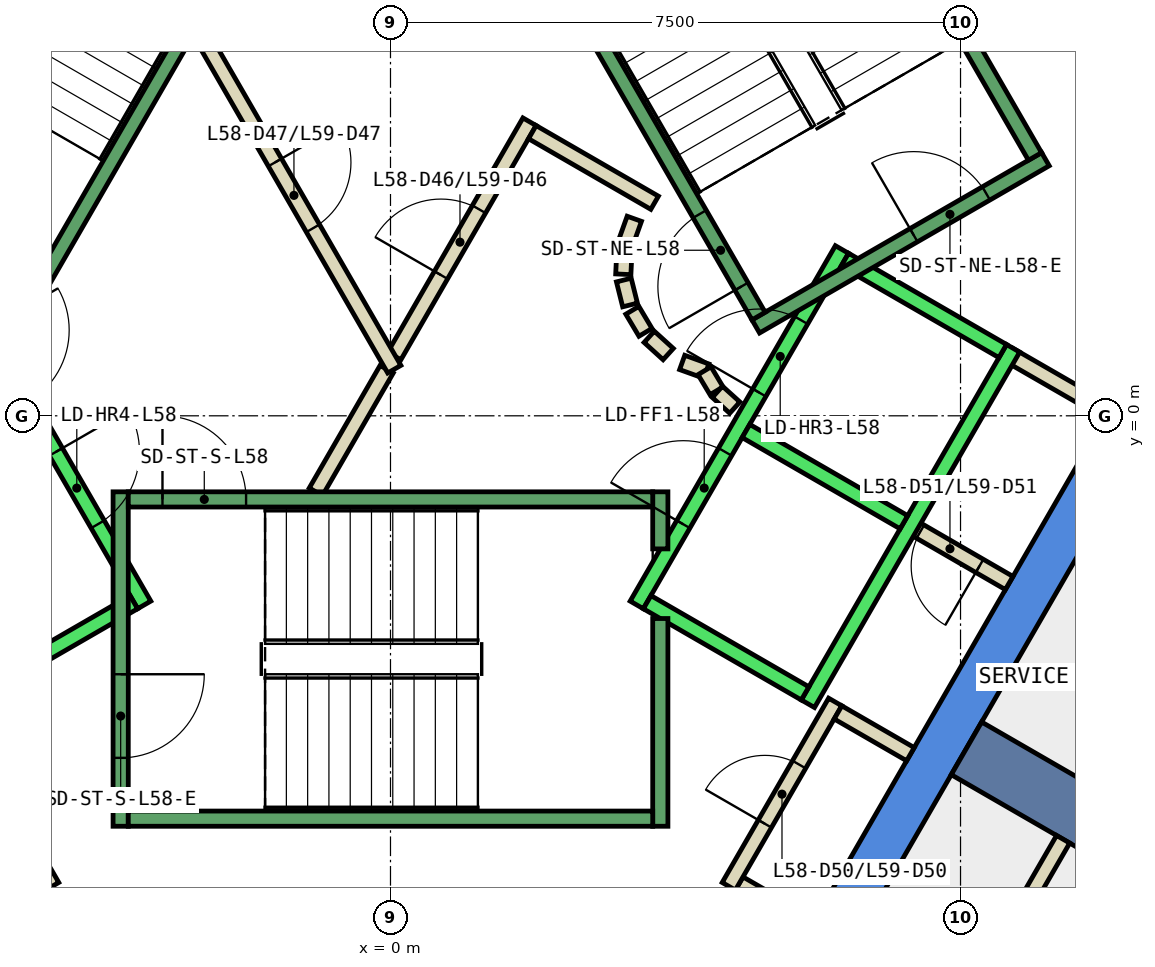
"""IFC4 building model, lengths in metres.
Left out: names, types, materials, properties, quantities, classifications, styles, units other than length and angle.
Written with IfcOpenShell. Run it as: python <this file> out.ifc"""

import sys

from ifc_helpers import new_model, si_unit, direction, frame, frame_2d, origin, place, context, subcontext, project, spatial, polyline, rectangle, outline, extrude, element, fill, save


model = new_model("IFC4")
c1 = context("Model", 3, precision=1e-05, world=origin(), true_north=direction((0.0, 1.0)))
c2 = subcontext(c1, "Body", "Model", "MODEL_VIEW")
j1 = project(units=[si_unit("LENGTHUNIT", "METRE"), si_unit("PLANEANGLEUNIT", "RADIAN")], contexts=[c1])
p1 = place(None, origin())
s1 = spatial("IfcSite", under=j1, at=p1, CompositionType="ELEMENT")
p2 = place(p1, origin())
s2 = spatial("IfcBuilding", under=s1, at=p2, CompositionType="ELEMENT")
p3 = place(p2, frame((0.0, 0.0, 255.8)))
s3 = spatial("IfcBuildingStorey", under=s2, at=p3, CompositionType="ELEMENT", Elevation=255.8)
p4 = place(p3, frame((0.0, 0.0, -0.34)))
e1 = element("IfcWall", 1, at=p4, inside=s3, PredefinedType="SHEAR", context=c2, shape_type="SweptSolid", body=[
    extrude(outline(polyline([(6.786, 10.747), (6.266, 10.447), (10.854, 2.5), (11.547, 2.5), (6.786, 10.747)])), origin(), (0.0, 0.0, 1.0), 3.6),
])
p5 = place(p3, frame((0.0, 0.0, -0.34)))
e2 = element("IfcWall", 2, at=p5, inside=s3, PredefinedType="SHEAR", context=c2, shape_type="SweptSolid", body=[
    extrude(outline(polyline([(5.774, -7.5), (11.547, 2.5), (10.854, 2.5), (5.427, -6.9), (5.774, -7.5)])), origin(), (0.0, 0.0, 1.0), 3.6),
])
p6 = place(p3, frame((7.578, -4.375, -0.34), z_axis=(0.0, 0.0, 1.0), x_axis=(0.866024315419, -0.5000018851, 0.0)))
e3 = element("IfcWall", 3, at=p6, inside=s3, PredefinedType="SHEAR", context=c2, shape_type="SweptSolid", body=[
    extrude(rectangle(XDim=9.0, YDim=0.8, at=frame_2d((4.5, 0.0))), origin(), (0.0, 0.0, 1.0), 3.6),
])
p7 = place(p3, frame((5.541, -6.703, 0.0), z_axis=(0.0, 0.0, 1.0), x_axis=(-0.86621513555, 0.499671230855, 0.0)))
e4 = element("IfcWall", 4, at=p7, inside=s3, PredefinedType="PARTITIONING", context=c2, shape_type="SweptSolid", body=[
    extrude(rectangle(XDim=1.1, YDim=0.2, at=frame_2d((0.55, 0.0))), origin(), (0.0, 0.0, 1.0), 3.26),
])
p8 = place(p3, frame((4.451, -6.19, 0.0), z_axis=(0.0, 0.0, 1.0), x_axis=(0.500011755427, 0.866018616679, 0.0)))
e5 = element("IfcWall", 5, at=p8, inside=s3, PredefinedType="PARTITIONING", context=c2, shape_type="SweptSolid", body=[
    extrude(rectangle(XDim=2.8, YDim=0.2, at=frame_2d((1.4, 0.0))), origin(), (0.0, 0.0, 1.0), 3.26),
])
p9 = place(p8, frame((0.95, 0.0, 0.0)))
e6 = element("IfcOpeningElement", 6, at=p9, cuts=e5, PredefinedType="OPENING", context=c2, shape_type="SweptSolid", body=[
    extrude(rectangle(XDim=0.9, YDim=2.1, at=frame_2d((0.45, 1.05))), frame((0.0, 0.11, 0.0), z_axis=(0.0, -1.0, 0.0), x_axis=(1.0, 0.0, 0.0)), (0.0, 0.0, 1.0), 0.22),
])
p10 = place(p3, frame((5.888, -3.902, 0.0), z_axis=(0.0, 0.0, 1.0), x_axis=(0.86621513555, -0.499671230855, 0.0)))
e7 = element("IfcWall", 7, at=p10, inside=s3, PredefinedType="PARTITIONING", context=c2, shape_type="SweptSolid", body=[
    extrude(rectangle(XDim=1.1, YDim=0.2, at=frame_2d((0.55, 0.0))), origin(), (0.0, 0.0, 1.0), 3.26),
])
p11 = place(p3, frame((8.14, -2.2, 0.0), z_axis=(0.0, 0.0, 1.0), x_axis=(-0.865545166185, 0.500830874941, 0.0)))
e8 = element("IfcWall", 8, at=p11, inside=s3, PredefinedType="PARTITIONING", context=c2, shape_type="SweptSolid", body=[
    extrude(rectangle(XDim=1.5, YDim=0.2, at=frame_2d((0.75, 0.0))), origin(), (0.0, 0.0, 1.0), 3.26),
])
p12 = place(p11, frame((0.45, 0.0, 0.0)))
e9 = element("IfcOpeningElement", 9, at=p12, cuts=e8, PredefinedType="OPENING", context=c2, shape_type="SweptSolid", body=[
    extrude(rectangle(XDim=0.9, YDim=2.1, at=frame_2d((0.45, 1.05))), frame((0.0, 0.11, 0.0), z_axis=(0.0, -1.0, 0.0), x_axis=(1.0, 0.0, 0.0)), (0.0, 0.0, 1.0), 0.22),
])
p13 = place(p3, frame((8.141, 0.801, 0.0), z_axis=(0.0, 0.0, 1.0), x_axis=(0.866434738017, -0.499290341141, 0.0)))
e10 = element("IfcWall", 10, at=p13, inside=s3, PredefinedType="PARTITIONING", context=c2, shape_type="SweptSolid", body=[
    extrude(rectangle(XDim=1.5, YDim=0.2, at=frame_2d((0.75, 0.0))), origin(), (0.0, 0.0, 1.0), 3.26),
])
p14 = place(p3, frame((-5.851, -3.765, 0.0), z_axis=(0.0, 0.0, 1.0), x_axis=(0.500011755427, -0.866018616679, 0.0)))
e11 = element("IfcWall", 11, at=p14, inside=s3, PredefinedType="PARTITIONING", context=c2, shape_type="SweptSolid", body=[
    extrude(rectangle(XDim=2.8, YDim=0.2, at=frame_2d((1.4, 0.0))), origin(), (0.0, 0.0, 1.0), 3.26),
])
p15 = place(p14, frame((0.95, 0.0, 0.0)))
e12 = element("IfcOpeningElement", 12, at=p15, cuts=e11, PredefinedType="OPENING", context=c2, shape_type="SweptSolid", body=[
    extrude(rectangle(XDim=0.9, YDim=2.1, at=frame_2d((0.45, 1.05))), frame((0.0, 0.11, 0.0), z_axis=(0.0, -1.0, 0.0), x_axis=(1.0, 0.0, 0.0)), (0.0, 0.0, 1.0), 0.22),
])
p16 = place(p3, frame((7.8, -7.39, 0.0), z_axis=(0.0, 0.0, 1.0), x_axis=(0.499977374825, 0.866038466041, 0.0)))
e13 = element("IfcWall", 13, at=p16, inside=s3, PredefinedType="PARTITIONING", context=c2, shape_type="SweptSolid", body=[
    extrude(rectangle(XDim=2.1, YDim=0.2, at=frame_2d((1.05, 0.0))), origin(), (0.0, 0.0, 1.0), 3.26),
])
p17 = place(p3, frame((-0.982, -1.0, 0.0), z_axis=(0.0, 0.0, 1.0), x_axis=(0.50024047865, 0.865886518847, 0.0)))
e14 = element("IfcWall", 14, at=p17, inside=s3, PredefinedType="PARTITIONING", context=c2, shape_type="SweptSolid", body=[
    extrude(rectangle(XDim=1.863, YDim=0.2, at=frame_2d((0.931, 0.0))), origin(), (0.0, 0.0, 1.0), 3.26),
])
p18 = place(p3, frame((0.05, 0.787, 0.0), z_axis=(0.0, 0.0, 1.0), x_axis=(0.499954076797, 0.866051915934, 0.0)))
e15 = element("IfcWall", 15, at=p18, inside=s3, PredefinedType="PARTITIONING", context=c2, shape_type="SweptSolid", body=[
    extrude(rectangle(XDim=3.558, YDim=0.2, at=frame_2d((1.779, 0.0))), origin(), (0.0, 0.0, 1.0), 3.26),
])
p19 = place(p18, frame((1.229, 0.0, 0.0)))
e16 = element("IfcOpeningElement", 16, at=p19, cuts=e15, PredefinedType="OPENING", context=c2, shape_type="SweptSolid", body=[
    extrude(rectangle(XDim=1.0, YDim=2.1, at=frame_2d((0.5, 1.05))), frame((0.0, 0.11, 0.0), z_axis=(0.0, -1.0, 0.0), x_axis=(1.0, 0.0, 0.0)), (0.0, 0.0, 1.0), 0.22),
])
p20 = place(p3, frame((1.866, 3.732, 0.0), z_axis=(0.0, 0.0, 1.0), x_axis=(0.866043361281, -0.499968895414, 0.0)))
e17 = element("IfcWall", 17, at=p20, inside=s3, PredefinedType="PARTITIONING", context=c2, shape_type="SweptSolid", body=[
    extrude(rectangle(XDim=1.858, YDim=0.2, at=frame_2d((0.929, 0.0))), origin(), (0.0, 0.0, 1.0), 3.26),
])
p21 = place(p3, frame((3.208, 2.592, 0.0), z_axis=(0.0, 0.0, 1.0), x_axis=(-0.337388820924, -0.941365382578, 0.0)))
e18 = element("IfcWall", 18, at=p21, inside=s3, PredefinedType="PARTITIONING", context=c2, shape_type="SweptSolid", body=[
    extrude(rectangle(XDim=0.338, YDim=0.2, at=frame_2d((0.169, 0.0))), origin(), (0.0, 0.0, 1.0), 3.26),
])
p22 = place(p3, frame((3.079, 2.199, 0.0), z_axis=(0.0, 0.0, 1.0), x_axis=(-0.047771483479, -0.998858290933, 0.0)))
e19 = element("IfcWall", 19, at=p22, inside=s3, PredefinedType="PARTITIONING", context=c2, shape_type="SweptSolid", body=[
    extrude(rectangle(XDim=0.337, YDim=0.2, at=frame_2d((0.169, 0.0))), origin(), (0.0, 0.0, 1.0), 3.26),
])
p23 = place(p3, frame((3.07, 1.786, 0.0), z_axis=(0.0, 0.0, 1.0), x_axis=(0.242705583207, -0.970099994784, 0.0)))
e20 = element("IfcWall", 20, at=p23, inside=s3, PredefinedType="PARTITIONING", context=c2, shape_type="SweptSolid", body=[
    extrude(rectangle(XDim=0.338, YDim=0.2, at=frame_2d((0.169, 0.0))), origin(), (0.0, 0.0, 1.0), 3.26),
])
for number, where, z_axis, x_axis in (
    (21, (3.182, 1.388, 0.0), (0.0, 0.0, 1.0), (0.512, -0.859, 0.0)),
    (22, (3.404, 1.039, 0.0), (0.0, 0.0, 1.0), (0.74, -0.672, 0.0)),
):
    element("IfcWall", number, at=place(p3, frame(where, z_axis=z_axis, x_axis=x_axis)), inside=s3, PredefinedType="PARTITIONING", context=c2, shape_type="SweptSolid", body=[
        extrude(rectangle(XDim=0.338, YDim=0.2, at=frame_2d((0.169, 0.0))), origin(), (0.0, 0.0, 1.0), 3.26),
    ])
p24 = place(p3, frame((3.838, 0.702, 0.0), z_axis=(0.0, 0.0, 1.0), x_axis=(0.941035081519, -0.338308993895, 0.0)))
e23 = element("IfcWall", 23, at=p24, inside=s3, PredefinedType="PARTITIONING", context=c2, shape_type="SweptSolid", body=[
    extrude(rectangle(XDim=0.337, YDim=0.2, at=frame_2d((0.168, 0.0))), origin(), (0.0, 0.0, 1.0), 3.26),
])
p25 = place(p3, frame((4.132, 0.593, 0.0), z_axis=(0.0, 0.0, 1.0), x_axis=(0.513561617048, -0.858052717201, 0.0)))
e24 = element("IfcWall", 24, at=p25, inside=s3, PredefinedType="PARTITIONING", context=c2, shape_type="SweptSolid", body=[
    extrude(rectangle(XDim=0.308, YDim=0.2, at=frame_2d((0.154, 0.0))), origin(), (0.0, 0.0, 1.0), 3.26),
])
p26 = place(p3, frame((4.301, 0.315, 0.0), z_axis=(0.0, 0.0, 1.0), x_axis=(0.741798017506, -0.670623367639, 0.0)))
e25 = element("IfcWall", 25, at=p26, inside=s3, PredefinedType="PARTITIONING", context=c2, shape_type="SweptSolid", body=[
    extrude(rectangle(XDim=0.309, YDim=0.2, at=frame_2d((0.154, 0.0))), origin(), (0.0, 0.0, 1.0), 3.26),
])
p27 = place(p3, frame((-2.54, 5.1, 0.0), z_axis=(0.0, 0.0, 1.0), x_axis=(0.499925051871, -0.866068670783, 0.0)))
e26 = element("IfcWall", 26, at=p27, inside=s3, PredefinedType="PARTITIONING", context=c2, shape_type="SweptSolid", body=[
    extrude(rectangle(XDim=5.181, YDim=0.2, at=frame_2d((2.59, 0.0))), origin(), (0.0, 0.0, 1.0), 3.26),
])
p28 = place(p27, frame((2.04, 0.0, 0.0)))
e27 = element("IfcOpeningElement", 27, at=p28, cuts=e26, PredefinedType="OPENING", context=c2, shape_type="SweptSolid", body=[
    extrude(rectangle(XDim=1.0, YDim=2.1, at=frame_2d((0.5, 1.05))), frame((0.0, 0.11, 0.0), z_axis=(0.0, -1.0, 0.0), x_axis=(1.0, 0.0, 0.0)), (0.0, 0.0, 1.0), 0.22),
])
p29 = place(p3, frame((-5.94, 2.188, 0.0), z_axis=(0.0, 0.0, 1.0), x_axis=(0.500034260056, -0.866005622828, 0.0)))
e28 = element("IfcWall", 28, at=p29, inside=s3, PredefinedType="STANDARD", context=c2, shape_type="SweptSolid", body=[
    extrude(rectangle(XDim=5.399, YDim=0.2, at=frame_2d((2.7, 0.0))), origin(), (0.0, 0.0, 1.0), 3.26),
])
p30 = place(p29, frame((3.075, 0.0, 0.0)))
e29 = element("IfcOpeningElement", 29, at=p30, cuts=e28, PredefinedType="OPENING", context=c2, shape_type="SweptSolid", body=[
    extrude(rectangle(XDim=1.1, YDim=2.1, at=frame_2d((0.55, 1.05))), frame((0.0, 0.11, 0.0), z_axis=(0.0, -1.0, 0.0), x_axis=(1.0, 0.0, 0.0)), (0.0, 0.0, 1.0), 0.22),
])
p31 = place(p29, frame((1.225, 0.0, 0.0)))
e30 = element("IfcOpeningElement", 30, at=p31, cuts=e28, PredefinedType="OPENING", context=c2, shape_type="SweptSolid", body=[
    extrude(rectangle(XDim=1.1, YDim=2.1, at=frame_2d((0.55, 1.05))), frame((0.0, 0.11, 0.0), z_axis=(0.0, -1.0, 0.0), x_axis=(1.0, 0.0, 0.0)), (0.0, 0.0, 1.0), 0.22),
])
p32 = place(p3, frame((-3.377, -2.452, 0.0), z_axis=(0.0, 0.0, 1.0), x_axis=(-0.865955154139, -0.50012165622, 0.0)))
e31 = element("IfcWall", 31, at=p32, inside=s3, PredefinedType="STANDARD", context=c2, shape_type="SweptSolid", body=[
    extrude(rectangle(XDim=2.4, YDim=0.2, at=frame_2d((1.2, 0.0))), origin(), (0.0, 0.0, 1.0), 3.26),
])
p33 = place(p3, frame((3.24, -2.488, 0.0), z_axis=(0.0, 0.0, 1.0), x_axis=(0.500034260056, 0.866005622828, 0.0)))
e32 = element("IfcWall", 32, at=p33, inside=s3, PredefinedType="STANDARD", context=c2, shape_type="SweptSolid", body=[
    extrude(rectangle(XDim=5.399, YDim=0.2, at=frame_2d((2.7, 0.0))), origin(), (0.0, 0.0, 1.0), 3.26),
])
p34 = place(p33, frame((3.225, 0.0, 0.0)))
e33 = element("IfcOpeningElement", 33, at=p34, cuts=e32, PredefinedType="OPENING", context=c2, shape_type="SweptSolid", body=[
    extrude(rectangle(XDim=1.1, YDim=2.1, at=frame_2d((0.55, 1.05))), frame((0.0, 0.11, 0.0), z_axis=(0.0, -1.0, 0.0), x_axis=(1.0, 0.0, 0.0)), (0.0, 0.0, 1.0), 0.22),
])
p35 = place(p33, frame((1.225, 0.0, 0.0)))
e34 = element("IfcOpeningElement", 34, at=p35, cuts=e32, PredefinedType="OPENING", context=c2, shape_type="SweptSolid", body=[
    extrude(rectangle(XDim=1.1, YDim=2.1, at=frame_2d((0.55, 1.05))), frame((0.0, 0.11, 0.0), z_axis=(0.0, -1.0, 0.0), x_axis=(1.0, 0.0, 0.0)), (0.0, 0.0, 1.0), 0.22),
])
p36 = place(p3, frame((5.492, -3.788, 0.0), z_axis=(0.0, 0.0, 1.0), x_axis=(0.500034260056, 0.866005622828, 0.0)))
e35 = element("IfcWall", 35, at=p36, inside=s3, PredefinedType="STANDARD", context=c2, shape_type="SweptSolid", body=[
    extrude(rectangle(XDim=5.399, YDim=0.2, at=frame_2d((2.7, 0.0))), origin(), (0.0, 0.0, 1.0), 3.26),
])
p37 = place(p3, frame((3.377, -2.452, 0.0), z_axis=(0.0, 0.0, 1.0), x_axis=(0.865955154139, -0.50012165622, 0.0)))
e36 = element("IfcWall", 36, at=p37, inside=s3, PredefinedType="STANDARD", context=c2, shape_type="SweptSolid", body=[
    extrude(rectangle(XDim=2.4, YDim=0.2, at=frame_2d((1.2, 0.0))), origin(), (0.0, 0.0, 1.0), 3.26),
])
for number, where, z_axis, x_axis in (
    (37, (4.677, -0.2, 0.0), (0.0, 0.0, 1.0), (0.866, -0.5, 0.0)),
    (38, (5.977, 2.052, 0.0), (0.0, 0.0, 1.0), (0.866, -0.5, 0.0)),
):
    element("IfcWall", number, at=place(p3, frame(where, z_axis=z_axis, x_axis=x_axis)), inside=s3, PredefinedType="STANDARD", context=c2, shape_type="SweptSolid", body=[
        extrude(rectangle(XDim=2.399, YDim=0.2, at=frame_2d((1.2, 0.0))), origin(), (0.0, 0.0, 1.0), 3.26),
    ])
p38 = place(p3, frame((-3.55, -1.0, 0.0), z_axis=(0.0, 0.0, 1.0), x_axis=(0.0, -1.0, 0.0)))
e39 = element("IfcWall", 39, at=p38, inside=s3, PredefinedType="STANDARD", context=c2, shape_type="SweptSolid", body=[
    extrude(rectangle(XDim=4.4, YDim=0.2, at=frame_2d((2.2, 0.0))), origin(), (0.0, 0.0, 1.0), 3.26),
])
p39 = place(p38, frame((2.4, 0.0, 0.0)))
e40 = element("IfcOpeningElement", 40, at=p39, cuts=e39, PredefinedType="OPENING", context=c2, shape_type="SweptSolid", body=[
    extrude(rectangle(XDim=1.1, YDim=2.2, at=frame_2d((0.55, 1.1))), frame((0.0, 0.11, 0.0), z_axis=(0.0, -1.0, 0.0), x_axis=(1.0, 0.0, 0.0)), (0.0, 0.0, 1.0), 0.22),
])
p40 = place(p3, frame((3.55, -2.667, 0.0), z_axis=(0.0, 0.0, 1.0), x_axis=(0.0, -1.0, 0.0)))
e41 = element("IfcWall", 41, at=p40, inside=s3, PredefinedType="STANDARD", context=c2, shape_type="SweptSolid", body=[
    extrude(rectangle(XDim=2.733, YDim=0.2, at=frame_2d((1.366, 0.0))), origin(), (0.0, 0.0, 1.0), 3.26),
])
p41 = place(p3, frame((3.55, -1.0, 0.0), z_axis=(0.0, 0.0, 1.0), x_axis=(0.0, -1.0, 0.0)))
e42 = element("IfcWall", 42, at=p41, inside=s3, PredefinedType="STANDARD", context=c2, shape_type="SweptSolid", body=[
    extrude(rectangle(XDim=0.751, YDim=0.2, at=frame_2d((0.375, 0.0))), origin(), (0.0, 0.0, 1.0), 3.26),
])
p42 = place(p3, frame((-3.45, -1.1, 0.0), z_axis=(0.0, 0.0, 1.0), x_axis=(1.0, 0.0, 0.0)))
e43 = element("IfcWall", 43, at=p42, inside=s3, PredefinedType="STANDARD", context=c2, shape_type="SweptSolid", body=[
    extrude(rectangle(XDim=6.9, YDim=0.2, at=frame_2d((3.45, 0.0))), origin(), (0.0, 0.0, 1.0), 3.26),
])
p43 = place(p42, frame((0.45, 0.0, 0.0)))
e44 = element("IfcOpeningElement", 44, at=p43, cuts=e43, PredefinedType="OPENING", context=c2, shape_type="SweptSolid", body=[
    extrude(rectangle(XDim=1.1, YDim=2.2, at=frame_2d((0.55, 1.1))), frame((0.0, 0.11, 0.0), z_axis=(0.0, -1.0, 0.0), x_axis=(1.0, 0.0, 0.0)), (0.0, 0.0, 1.0), 0.22),
])
p44 = place(p3, frame((-3.45, -5.3, 0.0), z_axis=(0.0, 0.0, 1.0), x_axis=(1.0, 0.0, 0.0)))
e45 = element("IfcWall", 45, at=p44, inside=s3, PredefinedType="STANDARD", context=c2, shape_type="SweptSolid", body=[
    extrude(rectangle(XDim=6.9, YDim=0.2, at=frame_2d((3.45, 0.0))), origin(), (0.0, 0.0, 1.0), 3.26),
])
p45 = place(p3, frame((4.806, 1.176, 0.0), z_axis=(0.0, 0.0, 1.0), x_axis=(0.866059941101, 0.499940174841, 0.0)))
e46 = element("IfcWall", 46, at=p45, inside=s3, PredefinedType="STANDARD", context=c2, shape_type="SweptSolid", body=[
    extrude(rectangle(XDim=4.4, YDim=0.2, at=frame_2d((2.2, 0.0))), origin(), (0.0, 0.0, 1.0), 3.26),
])
p46 = place(p45, frame((2.4, 0.0, 0.0)))
e47 = element("IfcOpeningElement", 47, at=p46, cuts=e46, PredefinedType="OPENING", context=c2, shape_type="SweptSolid", body=[
    extrude(rectangle(XDim=1.1, YDim=2.2, at=frame_2d((0.55, 1.1))), frame((0.0, 0.11, 0.0), z_axis=(0.0, -1.0, 0.0), x_axis=(1.0, 0.0, 0.0)), (0.0, 0.0, 1.0), 0.22),
])
p47 = place(p3, frame((4.843, 1.312, 0.0), z_axis=(0.0, 0.0, 1.0), x_axis=(-0.499963383562, 0.866046543262, 0.0)))
e48 = element("IfcWall", 48, at=p47, inside=s3, PredefinedType="STANDARD", context=c2, shape_type="SweptSolid", body=[
    extrude(rectangle(XDim=6.9, YDim=0.2, at=frame_2d((3.45, 0.0))), origin(), (0.0, 0.0, 1.0), 3.26),
])
p48 = place(p47, frame((0.45, 0.0, 0.0)))
e49 = element("IfcOpeningElement", 49, at=p48, cuts=e48, PredefinedType="OPENING", context=c2, shape_type="SweptSolid", body=[
    extrude(rectangle(XDim=1.1, YDim=2.2, at=frame_2d((0.55, 1.1))), frame((0.0, 0.11, 0.0), z_axis=(0.0, -1.0, 0.0), x_axis=(1.0, 0.0, 0.0)), (0.0, 0.0, 1.0), 0.22),
])
p49 = place(p3, frame((8.48, 3.412, 0.0), z_axis=(0.0, 0.0, 1.0), x_axis=(-0.499978703459, 0.866037698999, 0.0)))
e50 = element("IfcWall", 50, at=p49, inside=s3, PredefinedType="STANDARD", context=c2, shape_type="SweptSolid", body=[
    extrude(rectangle(XDim=6.9, YDim=0.2, at=frame_2d((3.45, 0.0))), origin(), (0.0, 0.0, 1.0), 3.26),
])
p50 = place(p3, frame((-1.393, 7.288, 0.0), z_axis=(0.0, 0.0, 1.0), x_axis=(-0.499963383562, -0.866046543262, 0.0)))
e51 = element("IfcWall", 51, at=p50, inside=s3, PredefinedType="STANDARD", context=c2, shape_type="SweptSolid", body=[
    extrude(rectangle(XDim=6.9, YDim=0.2, at=frame_2d((3.45, 0.0))), origin(), (0.0, 0.0, 1.0), 3.26),
])
p51 = place(p50, frame((0.45, 0.0, 0.0)))
e52 = element("IfcOpeningElement", 52, at=p51, cuts=e51, PredefinedType="OPENING", context=c2, shape_type="SweptSolid", body=[
    extrude(rectangle(XDim=1.1, YDim=2.2, at=frame_2d((0.55, 1.1))), frame((0.0, 0.11, 0.0), z_axis=(0.0, -1.0, 0.0), x_axis=(1.0, 0.0, 0.0)), (0.0, 0.0, 1.0), 0.22),
])
p52 = place(p19, origin())
e53 = element("IfcDoor", 53, at=p52, inside=s3, OperationType="SINGLE_SWING_RIGHT", PredefinedType="DOOR", context=c2, shape_type="SweptSolid", body=[
    extrude(rectangle(XDim=1.0, YDim=2.1, at=frame_2d((0.5, 1.05))), frame((0.0, 0.025, 0.0), z_axis=(0.0, -1.0, 0.0), x_axis=(1.0, 0.0, 0.0)), (0.0, 0.0, 1.0), 0.05),
])
fill(e16, e53)
p53 = place(p28, origin())
e54 = element("IfcDoor", 54, at=p53, inside=s3, OperationType="SINGLE_SWING_RIGHT", PredefinedType="DOOR", context=c2, shape_type="SweptSolid", body=[
    extrude(rectangle(XDim=1.0, YDim=2.1, at=frame_2d((0.5, 1.05))), frame((0.0, 0.025, 0.0), z_axis=(0.0, -1.0, 0.0), x_axis=(1.0, 0.0, 0.0)), (0.0, 0.0, 1.0), 0.05),
])
fill(e27, e54)
p54 = place(p9, origin())
e55 = element("IfcDoor", 55, at=p54, inside=s3, OperationType="SINGLE_SWING_LEFT", PredefinedType="DOOR", context=c2, shape_type="SweptSolid", body=[
    extrude(rectangle(XDim=0.9, YDim=2.1, at=frame_2d((0.45, 1.05))), frame((0.0, 0.025, 0.0), z_axis=(0.0, -1.0, 0.0), x_axis=(1.0, 0.0, 0.0)), (0.0, 0.0, 1.0), 0.05),
])
fill(e6, e55)
p55 = place(p12, origin())
e56 = element("IfcDoor", 56, at=p55, inside=s3, OperationType="SINGLE_SWING_LEFT", PredefinedType="DOOR", context=c2, shape_type="SweptSolid", body=[
    extrude(rectangle(XDim=0.9, YDim=2.1, at=frame_2d((0.45, 1.05))), frame((0.0, 0.025, 0.0), z_axis=(0.0, -1.0, 0.0), x_axis=(1.0, 0.0, 0.0)), (0.0, 0.0, 1.0), 0.05),
])
fill(e9, e56)
p56 = place(p34, origin())
e57 = element("IfcDoor", 57, at=p56, inside=s3, OperationType="SLIDING_TO_LEFT", PredefinedType="DOOR", context=c2, shape_type="SweptSolid", body=[
    extrude(rectangle(XDim=1.1, YDim=2.1, at=frame_2d((0.55, 1.05))), frame((0.0, 0.025, 0.0), z_axis=(0.0, -1.0, 0.0), x_axis=(1.0, 0.0, 0.0)), (0.0, 0.0, 1.0), 0.05),
])
fill(e33, e57)
p57 = place(p30, origin())
e58 = element("IfcDoor", 58, at=p57, inside=s3, OperationType="SLIDING_TO_LEFT", PredefinedType="DOOR", context=c2, shape_type="SweptSolid", body=[
    extrude(rectangle(XDim=1.1, YDim=2.1, at=frame_2d((0.55, 1.05))), frame((0.0, 0.025, 0.0), z_axis=(0.0, -1.0, 0.0), x_axis=(1.0, 0.0, 0.0)), (0.0, 0.0, 1.0), 0.05),
])
fill(e29, e58)
p58 = place(p35, origin())
e59 = element("IfcDoor", 59, at=p58, inside=s3, OperationType="SLIDING_TO_LEFT", PredefinedType="DOOR", context=c2, shape_type="SweptSolid", body=[
    extrude(rectangle(XDim=1.1, YDim=2.1, at=frame_2d((0.55, 1.05))), frame((0.0, 0.025, 0.0), z_axis=(0.0, -1.0, 0.0), x_axis=(1.0, 0.0, 0.0)), (0.0, 0.0, 1.0), 0.05),
])
fill(e34, e59)
p59 = place(p43, origin())
e60 = element("IfcDoor", 60, at=p59, inside=s3, OperationType="SINGLE_SWING_LEFT", PredefinedType="DOOR", context=c2, shape_type="SweptSolid", body=[
    extrude(rectangle(XDim=1.1, YDim=2.2, at=frame_2d((0.55, 1.1))), frame((0.0, 0.025, 0.0), z_axis=(0.0, -1.0, 0.0), x_axis=(1.0, 0.0, 0.0)), (0.0, 0.0, 1.0), 0.05),
])
fill(e44, e60)
p60 = place(p39, origin())
e61 = element("IfcDoor", 61, at=p60, inside=s3, OperationType="SINGLE_SWING_LEFT", PredefinedType="DOOR", context=c2, shape_type="SweptSolid", body=[
    extrude(rectangle(XDim=1.1, YDim=2.2, at=frame_2d((0.55, 1.1))), frame((0.0, 0.025, 0.0), z_axis=(0.0, -1.0, 0.0), x_axis=(1.0, 0.0, 0.0)), (0.0, 0.0, 1.0), 0.05),
])
fill(e40, e61)
p61 = place(p48, origin())
e62 = element("IfcDoor", 62, at=p61, inside=s3, OperationType="SINGLE_SWING_LEFT", PredefinedType="DOOR", context=c2, shape_type="SweptSolid", body=[
    extrude(rectangle(XDim=1.1, YDim=2.2, at=frame_2d((0.55, 1.1))), frame((0.0, 0.025, 0.0), z_axis=(0.0, -1.0, 0.0), x_axis=(1.0, 0.0, 0.0)), (0.0, 0.0, 1.0), 0.05),
])
fill(e49, e62)
p62 = place(p46, origin())
e63 = element("IfcDoor", 63, at=p62, inside=s3, OperationType="SINGLE_SWING_LEFT", PredefinedType="DOOR", context=c2, shape_type="SweptSolid", body=[
    extrude(rectangle(XDim=1.1, YDim=2.2, at=frame_2d((0.55, 1.1))), frame((0.0, 0.025, 0.0), z_axis=(0.0, -1.0, 0.0), x_axis=(1.0, 0.0, 0.0)), (0.0, 0.0, 1.0), 0.05),
])
fill(e47, e63)
save(model, sys.argv[1])
